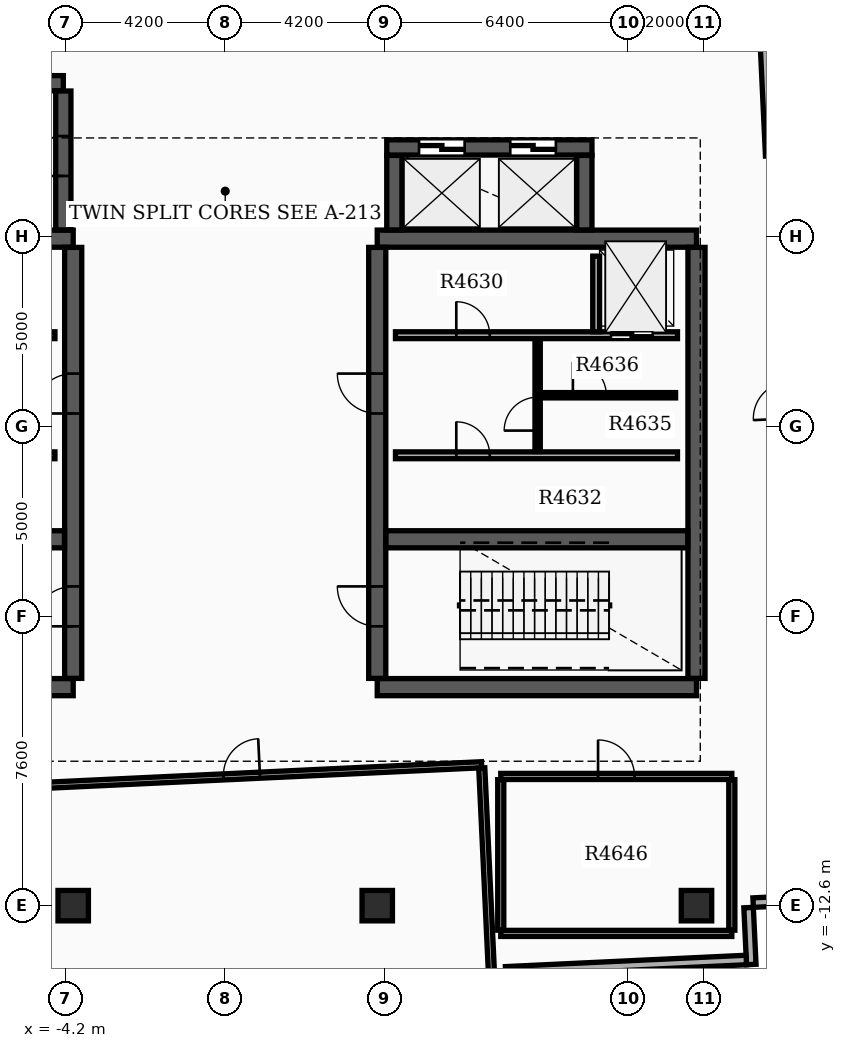
"""IFC4 building model, lengths in metres.
Left out: names, types, materials, properties, quantities, classifications, styles, units other than length and angle.
Written with IfcOpenShell. Run it as: python <this file> out.ifc"""

import sys

from ifc_helpers import new_model, si_unit, direction, frame, frame_2d, origin, origin_2d, place, context, subcontext, project, spatial, rectangle, extrude, element, fill, save


model = new_model("IFC4")
c1 = context("Model", 3, precision=1e-05, world=origin(), true_north=direction((0.0, 1.0)))
c2 = subcontext(c1, "Body", "Model", "MODEL_VIEW")
j1 = project(units=[si_unit("LENGTHUNIT", "METRE"), si_unit("PLANEANGLEUNIT", "RADIAN")], contexts=[c1])
p1 = place(None, origin())
s1 = spatial("IfcSite", under=j1, at=p1, CompositionType="ELEMENT")
p2 = place(p1, origin())
s2 = spatial("IfcBuilding", under=s1, at=p2, CompositionType="ELEMENT")
p3 = place(p2, frame((0.0, 0.0, 294.0)))
s3 = spatial("IfcBuildingStorey", under=s2, at=p3, CompositionType="ELEMENT", Elevation=294.0)
for number, where, z_axis, x_axis in (
    (1, (-12.4, -6.85, 0.0), (0.0, 0.0, 1.0), (1.0, 0.0, 0.0)),
    (2, (-12.4, 4.95, 0.0), (0.0, 0.0, 1.0), (1.0, 0.0, 0.0)),
):
    element("IfcWall", number, at=place(p3, frame(where, z_axis=z_axis, x_axis=x_axis)), inside=s3, PredefinedType="SHEAR", context=c2, shape_type="SweptSolid", body=[
        extrude(rectangle(XDim=8.4, YDim=0.45, at=frame_2d((4.2, 0.0))), origin(), (0.0, 0.0, 1.0), 5.15),
    ])
p4 = place(p3, frame((-4.0, -6.62, 0.0), z_axis=(0.0, 0.0, 1.0), x_axis=(0.0, 1.0, 0.0)))
e3 = element("IfcWall", 3, at=p4, inside=s3, PredefinedType="SHEAR", context=c2, shape_type="SweptSolid", body=[
    extrude(rectangle(XDim=11.34, YDim=0.45, at=frame_2d((5.67, 0.0))), origin(), (0.0, 0.0, 1.0), 5.15),
])
p5 = place(p4, frame((1.37, 0.0, 0.0)))
e4 = element("IfcOpeningElement", 4, at=p5, cuts=e3, PredefinedType="OPENING", context=c2, shape_type="SweptSolid", body=[
    extrude(rectangle(XDim=1.05, YDim=2.15, at=frame_2d((0.525, 1.075))), frame((0.0, 0.235, 0.0), z_axis=(0.0, -1.0, 0.0), x_axis=(1.0, 0.0, 0.0)), (0.0, 0.0, 1.0), 0.47),
])
p6 = place(p4, frame((6.97, 0.0, 0.0)))
e5 = element("IfcOpeningElement", 5, at=p6, cuts=e3, PredefinedType="OPENING", context=c2, shape_type="SweptSolid", body=[
    extrude(rectangle(XDim=1.05, YDim=2.15, at=frame_2d((0.525, 1.075))), frame((0.0, 0.235, 0.0), z_axis=(0.0, -1.0, 0.0), x_axis=(1.0, 0.0, 0.0)), (0.0, 0.0, 1.0), 0.47),
])
p7 = place(p3, frame((-12.17, -2.96, 0.0), z_axis=(0.0, 0.0, 1.0), x_axis=(1.0, 0.0, 0.0)))
e6 = element("IfcWall", 6, at=p7, inside=s3, PredefinedType="SHEAR", context=c2, shape_type="SweptSolid", body=[
    extrude(rectangle(XDim=7.94, YDim=0.45, at=frame_2d((3.97, 0.0))), origin(), (0.0, 0.0, 1.0), 5.15),
])
for number, where, z_axis, x_axis in (
    (7, (4.0, -6.85, 0.0), (0.0, 0.0, 1.0), (1.0, 0.0, 0.0)),
    (8, (4.0, 4.95, 0.0), (0.0, 0.0, 1.0), (1.0, 0.0, 0.0)),
):
    element("IfcWall", number, at=place(p3, frame(where, z_axis=z_axis, x_axis=x_axis)), inside=s3, PredefinedType="SHEAR", context=c2, shape_type="SweptSolid", body=[
        extrude(rectangle(XDim=8.4, YDim=0.45, at=frame_2d((4.2, 0.0))), origin(), (0.0, 0.0, 1.0), 5.15),
    ])
p8 = place(p3, frame((4.0, -6.62, 0.0), z_axis=(0.0, 0.0, 1.0), x_axis=(0.0, 1.0, 0.0)))
e9 = element("IfcWall", 9, at=p8, inside=s3, PredefinedType="SHEAR", context=c2, shape_type="SweptSolid", body=[
    extrude(rectangle(XDim=11.34, YDim=0.45, at=frame_2d((5.67, 0.0))), origin(), (0.0, 0.0, 1.0), 5.15),
])
p9 = place(p8, frame((1.37, 0.0, 0.0)))
e10 = element("IfcOpeningElement", 10, at=p9, cuts=e9, PredefinedType="OPENING", context=c2, shape_type="SweptSolid", body=[
    extrude(rectangle(XDim=1.05, YDim=2.15, at=frame_2d((0.525, 1.075))), frame((0.0, 0.235, 0.0), z_axis=(0.0, -1.0, 0.0), x_axis=(1.0, 0.0, 0.0)), (0.0, 0.0, 1.0), 0.47),
])
p10 = place(p8, frame((6.97, 0.0, 0.0)))
e11 = element("IfcOpeningElement", 11, at=p10, cuts=e9, PredefinedType="OPENING", context=c2, shape_type="SweptSolid", body=[
    extrude(rectangle(XDim=1.05, YDim=2.15, at=frame_2d((0.525, 1.075))), frame((0.0, 0.235, 0.0), z_axis=(0.0, -1.0, 0.0), x_axis=(1.0, 0.0, 0.0)), (0.0, 0.0, 1.0), 0.47),
])
p11 = place(p3, frame((12.4, -6.62, 0.0), z_axis=(0.0, 0.0, 1.0), x_axis=(0.0, 1.0, 0.0)))
e12 = element("IfcWall", 12, at=p11, inside=s3, PredefinedType="SHEAR", context=c2, shape_type="SweptSolid", body=[
    extrude(rectangle(XDim=11.34, YDim=0.45, at=frame_2d((5.67, 0.0))), origin(), (0.0, 0.0, 1.0), 5.15),
])
p12 = place(p3, frame((4.23, -2.96, 0.0), z_axis=(0.0, 0.0, 1.0), x_axis=(1.0, 0.0, 0.0)))
e13 = element("IfcWall", 13, at=p12, inside=s3, PredefinedType="SHEAR", context=c2, shape_type="SweptSolid", body=[
    extrude(rectangle(XDim=7.94, YDim=0.45, at=frame_2d((3.97, 0.0))), origin(), (0.0, 0.0, 1.0), 5.15),
])
p13 = place(p3, frame((-12.22, 9.04, 0.0), z_axis=(0.0, 0.0, 1.0), x_axis=(1.0, 0.0, 0.0)))
e14 = element("IfcWall", 14, at=p13, inside=s3, PredefinedType="SHEAR", context=c2, shape_type="SweptSolid", body=[
    extrude(rectangle(XDim=7.96, YDim=0.4, at=frame_2d((3.98, 0.0))), origin(), (0.0, 0.0, 1.0), 5.15),
])
p14 = place(p3, frame((-4.26, 5.18, 0.0), z_axis=(0.0, 0.0, 1.0), x_axis=(0.0, 1.0, 0.0)))
e15 = element("IfcWall", 15, at=p14, inside=s3, PredefinedType="SHEAR", context=c2, shape_type="SweptSolid", body=[
    extrude(rectangle(XDim=3.655, YDim=0.4, at=frame_2d((1.828, 0.0))), origin(), (0.0, 0.0, 1.0), 5.15),
])
p15 = place(p14, frame((1.42, 0.0, 0.0)))
e16 = element("IfcOpeningElement", 16, at=p15, cuts=e15, PredefinedType="OPENING", context=c2, shape_type="SweptSolid", body=[
    extrude(rectangle(XDim=1.05, YDim=2.15, at=frame_2d((0.525, 1.075))), frame((0.0, 0.21, 0.0), z_axis=(0.0, -1.0, 0.0), x_axis=(1.0, 0.0, 0.0)), (0.0, 0.0, 1.0), 0.42),
])
p16 = place(p3, frame((4.45, 5.18, 0.0), z_axis=(0.0, 0.0, 1.0), x_axis=(0.0, 1.0, 0.0)))
e17 = element("IfcWall", 17, at=p16, inside=s3, PredefinedType="SHEAR", context=c2, shape_type="SweptSolid", body=[
    extrude(rectangle(XDim=1.96, YDim=0.4, at=frame_2d((0.98, 0.0))), origin(), (0.0, 0.0, 1.0), 5.15),
])
p17 = place(p3, frame((4.25, 7.35, 0.0), z_axis=(0.0, 0.0, 1.0), x_axis=(1.0, 0.0, 0.0)))
e18 = element("IfcWall", 18, at=p17, inside=s3, PredefinedType="SHEAR", context=c2, shape_type="SweptSolid", body=[
    extrude(rectangle(XDim=5.4, YDim=0.4, at=frame_2d((2.7, 0.0))), origin(), (0.0, 0.0, 1.0), 5.15),
])
p18 = place(p17, frame((0.85, 0.0, 0.0)))
e19 = element("IfcOpeningElement", 19, at=p18, cuts=e18, PredefinedType="OPENING", context=c2, shape_type="SweptSolid", body=[
    extrude(rectangle(XDim=1.2, YDim=2.2, at=frame_2d((0.6, 1.1))), frame((0.0, 0.21, 0.0), z_axis=(0.0, -1.0, 0.0), x_axis=(1.0, 0.0, 0.0)), (0.0, 0.0, 1.0), 0.42),
])
p19 = place(p17, frame((3.25, 0.0, 0.0)))
e20 = element("IfcOpeningElement", 20, at=p19, cuts=e18, PredefinedType="OPENING", context=c2, shape_type="SweptSolid", body=[
    extrude(rectangle(XDim=1.2, YDim=2.2, at=frame_2d((0.6, 1.1))), frame((0.0, 0.21, 0.0), z_axis=(0.0, -1.0, 0.0), x_axis=(1.0, 0.0, 0.0)), (0.0, 0.0, 1.0), 0.42),
])
p20 = place(p3, frame((9.45, 5.18, 0.0), z_axis=(0.0, 0.0, 1.0), x_axis=(0.0, 1.0, 0.0)))
e21 = element("IfcWall", 21, at=p20, inside=s3, PredefinedType="SHEAR", context=c2, shape_type="SweptSolid", body=[
    extrude(rectangle(XDim=1.96, YDim=0.4, at=frame_2d((0.98, 0.0))), origin(), (0.0, 0.0, 1.0), 5.15),
])
for number, where, z_axis, x_axis in (
    (22, (12.4, -12.6, 0.0), (0.0, 0.0, 1.0), (1.0, 0.0, 0.0)),
    (23, (-4.0, -12.6, 0.0), (0.0, 0.0, 1.0), (1.0, 0.0, 0.0)),
    (24, (4.0, -12.6, 0.0), (0.0, 0.0, 1.0), (1.0, 0.0, 0.0)),
):
    element("IfcColumn", number, at=place(p3, frame(where, z_axis=z_axis, x_axis=x_axis)), inside=s3, PredefinedType="COLUMN", context=c2, shape_type="SweptSolid", body=[
        extrude(rectangle(XDim=0.8, YDim=0.8, at=origin_2d()), origin(), (0.0, 0.0, 1.0), 5.4),
    ])
p21 = place(p3, frame((14.34, 7.128, 0.0), z_axis=(0.0, 0.0, 1.0), x_axis=(-0.047115742593, 0.998889436725, 0.0)))
e25 = element("IfcWall", 25, at=p21, inside=s3, PredefinedType="STANDARD", context=c2, shape_type="SweptSolid", body=[
    extrude(rectangle(XDim=6.84, YDim=0.25, at=frame_2d((3.42, 0.0))), origin(), (0.0, 0.0, 1.0), 4.06),
])
p22 = place(p3, frame((15.139, -12.461, 0.0), z_axis=(0.0, 0.0, 1.0), x_axis=(-0.998891870632, -0.047064113553, 0.0)))
e26 = element("IfcWall", 26, at=p22, inside=s3, PredefinedType="STANDARD", context=c2, shape_type="SweptSolid", body=[
    extrude(rectangle(XDim=1.25, YDim=0.25, at=frame_2d((0.625, 0.0))), origin(), (0.0, 0.0, 1.0), 4.06),
])
p23 = place(p3, frame((13.771, -12.65, 0.0), z_axis=(0.0, 0.0, 1.0), x_axis=(0.047039284441, -0.99889304018, 0.0)))
e27 = element("IfcWall", 27, at=p23, inside=s3, PredefinedType="STANDARD", context=c2, shape_type="SweptSolid", body=[
    extrude(rectangle(XDim=1.5, YDim=0.25, at=frame_2d((0.75, 0.0))), origin(), (0.0, 0.0, 1.0), 4.06),
])
p24 = place(p3, frame((13.711, -14.03, 0.0), z_axis=(0.0, 0.0, 1.0), x_axis=(-0.998890417296, -0.047094949127, 0.0)))
e28 = element("IfcWall", 28, at=p24, inside=s3, PredefinedType="STANDARD", context=c2, shape_type="SweptSolid", body=[
    extrude(rectangle(XDim=6.34, YDim=0.25, at=frame_2d((3.17, 0.0))), origin(), (0.0, 0.0, 1.0), 4.06),
])
p25 = place(p3, frame((-11.9, 2.41, 0.0), z_axis=(0.0, 0.0, 1.0), x_axis=(1.0, 0.0, 0.0)))
e29 = element("IfcWall", 29, at=p25, inside=s3, PredefinedType="SOLIDWALL", context=c2, shape_type="SweptSolid", body=[
    extrude(rectangle(XDim=7.42, YDim=0.18, at=frame_2d((3.71, 0.0))), origin(), (0.0, 0.0, 1.0), 4.05),
])
p26 = place(p25, frame((0.55, 0.0, 0.0)))
e30 = element("IfcOpeningElement", 30, at=p26, cuts=e29, PredefinedType="OPENING", context=c2, shape_type="SweptSolid", body=[
    extrude(rectangle(XDim=1.1, YDim=2.15, at=frame_2d((0.55, 1.075))), frame((0.0, 0.1, 0.0), z_axis=(0.0, -1.0, 0.0), x_axis=(1.0, 0.0, 0.0)), (0.0, 0.0, 1.0), 0.2),
])
p27 = place(p25, frame((4.9, 0.0, 0.0)))
e31 = element("IfcOpeningElement", 31, at=p27, cuts=e29, PredefinedType="OPENING", context=c2, shape_type="SweptSolid", body=[
    extrude(rectangle(XDim=0.88, YDim=2.1, at=frame_2d((0.44, 1.05))), frame((0.0, 0.1, 0.0), z_axis=(0.0, -1.0, 0.0), x_axis=(1.0, 0.0, 0.0)), (0.0, 0.0, 1.0), 0.2),
])
p28 = place(p3, frame((4.48, 2.41, 0.0), z_axis=(0.0, 0.0, 1.0), x_axis=(1.0, 0.0, 0.0)))
e32 = element("IfcWall", 32, at=p28, inside=s3, PredefinedType="SOLIDWALL", context=c2, shape_type="SweptSolid", body=[
    extrude(rectangle(XDim=7.42, YDim=0.18, at=frame_2d((3.71, 0.0))), origin(), (0.0, 0.0, 1.0), 4.05),
])
p29 = place(p28, frame((5.67, 0.0, 0.0)))
e33 = element("IfcOpeningElement", 33, at=p29, cuts=e32, PredefinedType="OPENING", context=c2, shape_type="SweptSolid", body=[
    extrude(rectangle(XDim=1.1, YDim=2.15, at=frame_2d((0.55, 1.075))), frame((0.0, 0.1, 0.0), z_axis=(0.0, -1.0, 0.0), x_axis=(1.0, 0.0, 0.0)), (0.0, 0.0, 1.0), 0.2),
])
p30 = place(p28, frame((1.6, 0.0, 0.0)))
e34 = element("IfcOpeningElement", 34, at=p30, cuts=e32, PredefinedType="OPENING", context=c2, shape_type="SweptSolid", body=[
    extrude(rectangle(XDim=0.88, YDim=2.1, at=frame_2d((0.44, 1.05))), frame((0.0, 0.1, 0.0), z_axis=(0.0, -1.0, 0.0), x_axis=(1.0, 0.0, 0.0)), (0.0, 0.0, 1.0), 0.2),
])
p31 = place(p3, frame((-11.9, -0.75, 0.0), z_axis=(0.0, 0.0, 1.0), x_axis=(1.0, 0.0, 0.0)))
e35 = element("IfcWall", 35, at=p31, inside=s3, PredefinedType="SOLIDWALL", context=c2, shape_type="SweptSolid", body=[
    extrude(rectangle(XDim=7.42, YDim=0.18, at=frame_2d((3.71, 0.0))), origin(), (0.0, 0.0, 1.0), 4.05),
])
p32 = place(p31, frame((1.6, 0.0, 0.0)))
e36 = element("IfcOpeningElement", 36, at=p32, cuts=e35, PredefinedType="OPENING", context=c2, shape_type="SweptSolid", body=[
    extrude(rectangle(XDim=0.88, YDim=2.1, at=frame_2d((0.44, 1.05))), frame((0.0, 0.1, 0.0), z_axis=(0.0, -1.0, 0.0), x_axis=(1.0, 0.0, 0.0)), (0.0, 0.0, 1.0), 0.2),
])
p33 = place(p3, frame((4.48, -0.75, 0.0), z_axis=(0.0, 0.0, 1.0), x_axis=(1.0, 0.0, 0.0)))
e37 = element("IfcWall", 37, at=p33, inside=s3, PredefinedType="SOLIDWALL", context=c2, shape_type="SweptSolid", body=[
    extrude(rectangle(XDim=7.42, YDim=0.18, at=frame_2d((3.71, 0.0))), origin(), (0.0, 0.0, 1.0), 4.05),
])
p34 = place(p33, frame((1.6, 0.0, 0.0)))
e38 = element("IfcOpeningElement", 38, at=p34, cuts=e37, PredefinedType="OPENING", context=c2, shape_type="SweptSolid", body=[
    extrude(rectangle(XDim=0.88, YDim=2.1, at=frame_2d((0.44, 1.05))), frame((0.0, 0.1, 0.0), z_axis=(0.0, -1.0, 0.0), x_axis=(1.0, 0.0, 0.0)), (0.0, 0.0, 1.0), 0.2),
])
p35 = place(p3, frame((9.76, 2.5, 0.0), z_axis=(0.0, 0.0, 1.0), x_axis=(0.0, 1.0, 0.0)))
e39 = element("IfcWall", 39, at=p35, inside=s3, PredefinedType="SOLIDWALL", context=c2, shape_type="SweptSolid", body=[
    extrude(rectangle(XDim=1.99, YDim=0.18, at=frame_2d((0.995, 0.0))), origin(), (0.0, 0.0, 1.0), 4.05),
])
p36 = place(p3, frame((8.22, -0.65, 0.0), z_axis=(0.0, 0.0, 1.0), x_axis=(0.0, 1.0, 0.0)))
e40 = element("IfcWall", 40, at=p36, inside=s3, PredefinedType="SOLIDWALL", context=c2, shape_type="SweptSolid", body=[
    extrude(rectangle(XDim=2.96, YDim=0.14, at=frame_2d((1.48, 0.0))), origin(), (0.0, 0.0, 1.0), 4.05),
])
p37 = place(p36, frame((0.55, 0.0, 0.0)))
e41 = element("IfcOpeningElement", 41, at=p37, cuts=e40, PredefinedType="OPENING", context=c2, shape_type="SweptSolid", body=[
    extrude(rectangle(XDim=0.88, YDim=2.1, at=frame_2d((0.44, 1.05))), frame((0.0, 0.08, 0.0), z_axis=(0.0, -1.0, 0.0), x_axis=(1.0, 0.0, 0.0)), (0.0, 0.0, 1.0), 0.16),
])
p38 = place(p3, frame((8.298, 0.83, 0.0), z_axis=(0.0, 0.0, 1.0), x_axis=(1.0, 0.0, 0.0)))
e42 = element("IfcWall", 42, at=p38, inside=s3, PredefinedType="PARTITIONING", context=c2, shape_type="SweptSolid", body=[
    extrude(rectangle(XDim=3.552, YDim=0.14, at=frame_2d((1.776, 0.0))), origin(), (0.0, 0.0, 1.0), 4.05),
])
p39 = place(p38, frame((0.85, 0.0, 0.0)))
e43 = element("IfcOpeningElement", 43, at=p39, cuts=e42, PredefinedType="OPENING", context=c2, shape_type="SweptSolid", body=[
    extrude(rectangle(XDim=0.88, YDim=2.1, at=frame_2d((0.44, 1.05))), frame((0.0, 0.08, 0.0), z_axis=(0.0, -1.0, 0.0), x_axis=(1.0, 0.0, 0.0)), (0.0, 0.0, 1.0), 0.16),
])
p40 = place(p3, frame((-5.88, -9.488, 0.0), z_axis=(0.0, 0.0, 1.0), x_axis=(0.998889751946, 0.047109059189, 0.0)))
e44 = element("IfcWall", 44, at=p40, inside=s3, PredefinedType="PARTITIONING", context=c2, shape_type="SweptSolid", body=[
    extrude(rectangle(XDim=12.64, YDim=0.16, at=frame_2d((6.32, 0.0))), origin(), (0.0, 0.0, 1.0), 4.05),
])
p41 = place(p40, frame((5.84, 0.0, 0.0)))
e45 = element("IfcOpeningElement", 45, at=p41, cuts=e44, PredefinedType="OPENING", context=c2, shape_type="SweptSolid", body=[
    extrude(rectangle(XDim=0.96, YDim=2.15, at=frame_2d((0.48, 1.075))), frame((0.0, 0.09, 0.0), z_axis=(0.0, -1.0, 0.0), x_axis=(1.0, 0.0, 0.0)), (0.0, 0.0, 1.0), 0.18),
])
p42 = place(p3, frame((7.606, -27.119, 0.0), z_axis=(0.0, 0.0, 1.0), x_axis=(-0.047102111975, 0.998890079562, 0.0)))
e46 = element("IfcWall", 46, at=p42, inside=s3, PredefinedType="PARTITIONING", context=c2, shape_type="SweptSolid", body=[
    extrude(rectangle(XDim=18.162, YDim=0.16, at=frame_2d((9.081, 0.0))), origin(), (0.0, 0.0, 1.0), 4.05),
])
p43 = place(p3, frame((7.25, -13.33, 0.0), z_axis=(0.0, 0.0, 1.0), x_axis=(1.0, 0.0, 0.0)))
e47 = element("IfcWall", 47, at=p43, inside=s3, PredefinedType="PARTITIONING", context=c2, shape_type="SweptSolid", body=[
    extrude(rectangle(XDim=6.08, YDim=0.16, at=frame_2d((3.04, 0.0))), origin(), (0.0, 0.0, 1.0), 4.05),
])
p44 = place(p3, frame((7.25, -9.2, 0.0), z_axis=(0.0, 0.0, 1.0), x_axis=(1.0, 0.0, 0.0)))
e48 = element("IfcWall", 48, at=p44, inside=s3, PredefinedType="PARTITIONING", context=c2, shape_type="SweptSolid", body=[
    extrude(rectangle(XDim=6.08, YDim=0.16, at=frame_2d((3.04, 0.0))), origin(), (0.0, 0.0, 1.0), 4.05),
])
p45 = place(p44, frame((2.56, 0.0, 0.0)))
e49 = element("IfcOpeningElement", 49, at=p45, cuts=e48, PredefinedType="OPENING", context=c2, shape_type="SweptSolid", body=[
    extrude(rectangle(XDim=0.96, YDim=2.15, at=frame_2d((0.48, 1.075))), frame((0.0, 0.09, 0.0), z_axis=(0.0, -1.0, 0.0), x_axis=(1.0, 0.0, 0.0)), (0.0, 0.0, 1.0), 0.18),
])
for number, where, z_axis, x_axis in (
    (50, (7.25, -13.245, 0.0), (0.0, 0.0, 1.0), (0.0, 1.0, 0.0)),
    (51, (13.33, -13.245, 0.0), (0.0, 0.0, 1.0), (0.0, 1.0, 0.0)),
):
    element("IfcWall", number, at=place(p3, frame(where, z_axis=z_axis, x_axis=x_axis)), inside=s3, PredefinedType="PARTITIONING", context=c2, shape_type="SweptSolid", body=[
        extrude(rectangle(XDim=3.96, YDim=0.16, at=frame_2d((1.98, 0.0))), origin(), (0.0, 0.0, 1.0), 4.05),
    ])
p46 = place(p5, origin())
e52 = element("IfcDoor", 52, at=p46, inside=s3, OperationType="SINGLE_SWING_LEFT", PredefinedType="DOOR", context=c2, shape_type="SweptSolid", body=[
    extrude(rectangle(XDim=1.05, YDim=2.15, at=frame_2d((0.525, 1.075))), frame((0.0, 0.025, 0.0), z_axis=(0.0, -1.0, 0.0), x_axis=(1.0, 0.0, 0.0)), (0.0, 0.0, 1.0), 0.05),
])
fill(e4, e52)
p47 = place(p9, origin())
e53 = element("IfcDoor", 53, at=p47, inside=s3, OperationType="SINGLE_SWING_RIGHT", PredefinedType="DOOR", context=c2, shape_type="SweptSolid", body=[
    extrude(rectangle(XDim=1.05, YDim=2.15, at=frame_2d((0.525, 1.075))), frame((0.0, 0.025, 0.0), z_axis=(0.0, -1.0, 0.0), x_axis=(1.0, 0.0, 0.0)), (0.0, 0.0, 1.0), 0.05),
])
fill(e10, e53)
p48 = place(p6, origin())
e54 = element("IfcDoor", 54, at=p48, inside=s3, OperationType="SINGLE_SWING_LEFT", PredefinedType="DOOR", context=c2, shape_type="SweptSolid", body=[
    extrude(rectangle(XDim=1.05, YDim=2.15, at=frame_2d((0.525, 1.075))), frame((0.0, 0.025, 0.0), z_axis=(0.0, -1.0, 0.0), x_axis=(1.0, 0.0, 0.0)), (0.0, 0.0, 1.0), 0.05),
])
fill(e5, e54)
p49 = place(p10, origin())
e55 = element("IfcDoor", 55, at=p49, inside=s3, OperationType="SINGLE_SWING_RIGHT", PredefinedType="DOOR", context=c2, shape_type="SweptSolid", body=[
    extrude(rectangle(XDim=1.05, YDim=2.15, at=frame_2d((0.525, 1.075))), frame((0.0, 0.025, 0.0), z_axis=(0.0, -1.0, 0.0), x_axis=(1.0, 0.0, 0.0)), (0.0, 0.0, 1.0), 0.05),
])
fill(e11, e55)
p50 = place(p15, origin())
e56 = element("IfcDoor", 56, at=p50, inside=s3, OperationType="SINGLE_SWING_LEFT", PredefinedType="DOOR", context=c2, shape_type="SweptSolid", body=[
    extrude(rectangle(XDim=1.05, YDim=2.15, at=frame_2d((0.525, 1.075))), frame((0.0, 0.025, 0.0), z_axis=(0.0, -1.0, 0.0), x_axis=(1.0, 0.0, 0.0)), (0.0, 0.0, 1.0), 0.05),
])
fill(e16, e56)
p51 = place(p29, origin())
e57 = element("IfcDoor", 57, at=p51, inside=s3, OperationType="DOUBLE_DOOR_SLIDING", PredefinedType="DOOR", context=c2, shape_type="SweptSolid", body=[
    extrude(rectangle(XDim=1.1, YDim=2.15, at=frame_2d((0.55, 1.075))), frame((0.0, 0.025, 0.0), z_axis=(0.0, -1.0, 0.0), x_axis=(1.0, 0.0, 0.0)), (0.0, 0.0, 1.0), 0.05),
])
fill(e33, e57)
p52 = place(p18, origin())
e58 = element("IfcDoor", 58, at=p52, inside=s3, OperationType="DOUBLE_DOOR_SLIDING", PredefinedType="DOOR", context=c2, shape_type="SweptSolid", body=[
    extrude(rectangle(XDim=1.2, YDim=2.2, at=frame_2d((0.6, 1.1))), frame((0.0, 0.025, 0.0), z_axis=(0.0, -1.0, 0.0), x_axis=(1.0, 0.0, 0.0)), (0.0, 0.0, 1.0), 0.05),
])
fill(e19, e58)
p53 = place(p19, origin())
e59 = element("IfcDoor", 59, at=p53, inside=s3, OperationType="DOUBLE_DOOR_SLIDING", PredefinedType="DOOR", context=c2, shape_type="SweptSolid", body=[
    extrude(rectangle(XDim=1.2, YDim=2.2, at=frame_2d((0.6, 1.1))), frame((0.0, 0.025, 0.0), z_axis=(0.0, -1.0, 0.0), x_axis=(1.0, 0.0, 0.0)), (0.0, 0.0, 1.0), 0.05),
])
fill(e20, e59)
p54 = place(p30, origin())
e60 = element("IfcDoor", 60, at=p54, inside=s3, OperationType="SINGLE_SWING_LEFT", PredefinedType="DOOR", context=c2, shape_type="SweptSolid", body=[
    extrude(rectangle(XDim=0.88, YDim=2.1, at=frame_2d((0.44, 1.05))), frame((0.0, 0.025, 0.0), z_axis=(0.0, -1.0, 0.0), x_axis=(1.0, 0.0, 0.0)), (0.0, 0.0, 1.0), 0.05),
])
fill(e34, e60)
p55 = place(p34, origin())
e61 = element("IfcDoor", 61, at=p55, inside=s3, OperationType="SINGLE_SWING_LEFT", PredefinedType="DOOR", context=c2, shape_type="SweptSolid", body=[
    extrude(rectangle(XDim=0.88, YDim=2.1, at=frame_2d((0.44, 1.05))), frame((0.0, 0.025, 0.0), z_axis=(0.0, -1.0, 0.0), x_axis=(1.0, 0.0, 0.0)), (0.0, 0.0, 1.0), 0.05),
])
fill(e38, e61)
p56 = place(p37, origin())
e62 = element("IfcDoor", 62, at=p56, inside=s3, OperationType="SINGLE_SWING_LEFT", PredefinedType="DOOR", context=c2, shape_type="SweptSolid", body=[
    extrude(rectangle(XDim=0.88, YDim=2.1, at=frame_2d((0.44, 1.05))), frame((0.0, 0.025, 0.0), z_axis=(0.0, -1.0, 0.0), x_axis=(1.0, 0.0, 0.0)), (0.0, 0.0, 1.0), 0.05),
])
fill(e41, e62)
p57 = place(p39, origin())
e63 = element("IfcDoor", 63, at=p57, inside=s3, OperationType="SINGLE_SWING_LEFT", PredefinedType="DOOR", context=c2, shape_type="SweptSolid", body=[
    extrude(rectangle(XDim=0.88, YDim=2.1, at=frame_2d((0.44, 1.05))), frame((0.0, 0.025, 0.0), z_axis=(0.0, -1.0, 0.0), x_axis=(1.0, 0.0, 0.0)), (0.0, 0.0, 1.0), 0.05),
])
fill(e43, e63)
p58 = place(p41, origin())
e64 = element("IfcDoor", 64, at=p58, inside=s3, OperationType="SINGLE_SWING_RIGHT", PredefinedType="DOOR", context=c2, shape_type="SweptSolid", body=[
    extrude(rectangle(XDim=0.96, YDim=2.15, at=frame_2d((0.48, 1.075))), frame((0.0, 0.025, 0.0), z_axis=(0.0, -1.0, 0.0), x_axis=(1.0, 0.0, 0.0)), (0.0, 0.0, 1.0), 0.05),
])
fill(e45, e64)
p59 = place(p45, origin())
e65 = element("IfcDoor", 65, at=p59, inside=s3, OperationType="SINGLE_SWING_LEFT", PredefinedType="DOOR", context=c2, shape_type="SweptSolid", body=[
    extrude(rectangle(XDim=0.96, YDim=2.15, at=frame_2d((0.48, 1.075))), frame((0.0, 0.025, 0.0), z_axis=(0.0, -1.0, 0.0), x_axis=(1.0, 0.0, 0.0)), (0.0, 0.0, 1.0), 0.05),
])
fill(e49, e65)
save(model, sys.argv[1])
